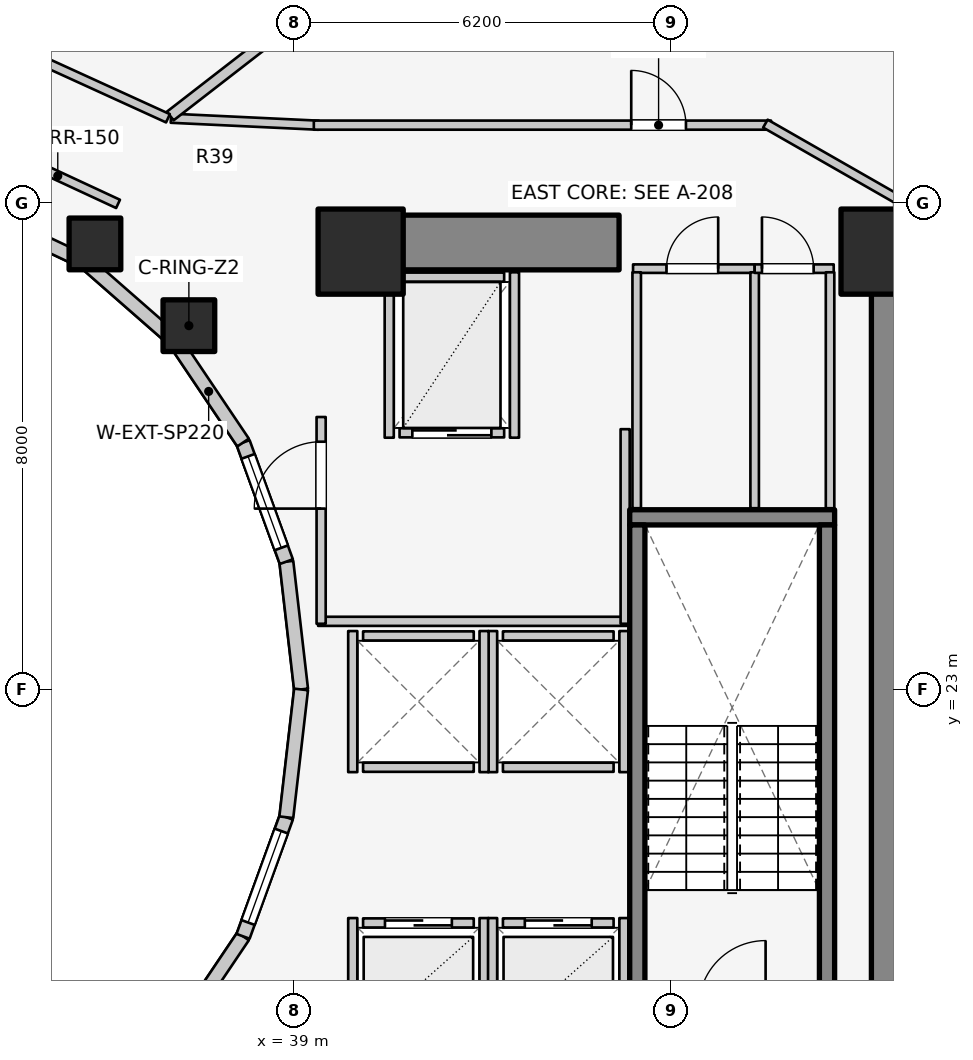
"""IFC4 building model, lengths in metres.
Left out: names, types, materials, properties, quantities, classifications, styles, units other than length and angle.
Written with IfcOpenShell. Run it as: python <this file> out.ifc"""

import sys

from ifc_helpers import new_model, si_unit, direction, frame, frame_2d, origin, origin_2d, place, context, subcontext, project, spatial, rectangle, extrude, element, fill, save


model = new_model("IFC4")
c1 = context("Model", 3, precision=1e-05, world=origin(), true_north=direction((0.0, 1.0)))
c2 = subcontext(c1, "Body", "Model", "MODEL_VIEW")
j1 = project(units=[si_unit("LENGTHUNIT", "METRE"), si_unit("PLANEANGLEUNIT", "RADIAN")], contexts=[c1])
p1 = place(None, origin())
s1 = spatial("IfcSite", under=j1, at=p1, CompositionType="ELEMENT")
p2 = place(p1, origin())
s2 = spatial("IfcBuilding", under=s1, at=p2, CompositionType="ELEMENT")
p3 = place(p2, frame((0.0, 0.0, 79.4)))
s3 = spatial("IfcBuildingStorey", under=s2, at=p3, CompositionType="ELEMENT", Elevation=79.4)
p4 = place(p3, frame((48.95, 17.05, 0.0), z_axis=(0.0, 0.0, 1.0), x_axis=(0.0, 1.0, 0.0)))
e1 = element("IfcWall", 1, at=p4, inside=s3, PredefinedType="SHEAR", context=c2, shape_type="SweptSolid", body=[
    extrude(rectangle(XDim=12.8, YDim=0.9, at=frame_2d((6.4, 0.0))), origin(), (0.0, 0.0, 1.0), 3.1),
])
p5 = place(p3, frame((39.85, 30.35, 0.0), z_axis=(0.0, 0.0, 1.0), x_axis=(1.0, 0.0, 0.0)))
e2 = element("IfcWall", 2, at=p5, inside=s3, PredefinedType="SHEAR", context=c2, shape_type="SweptSolid", body=[
    extrude(rectangle(XDim=4.5, YDim=0.9, at=frame_2d((2.25, 0.0))), origin(), (0.0, 0.0, 1.0), 3.1),
])
p6 = place(p3, frame((44.525, 25.83, 0.0), z_axis=(0.0, 0.0, 1.0), x_axis=(1.0, 0.0, 0.0)))
e3 = element("IfcWall", 3, at=p6, inside=s3, PredefinedType="SOLIDWALL", context=c2, shape_type="SweptSolid", body=[
    extrude(rectangle(XDim=3.37, YDim=0.25, at=frame_2d((1.685, 0.0))), origin(), (0.0, 0.0, 1.0), 3.1),
])
for number, where, z_axis, x_axis in (
    (4, (44.65, 17.895, 0.0), (0.0, 0.0, 1.0), (0.0, 1.0, 0.0)),
    (5, (47.77, 17.895, 0.0), (0.0, 0.0, 1.0), (0.0, 1.0, 0.0)),
):
    element("IfcWall", number, at=place(p3, frame(where, z_axis=z_axis, x_axis=x_axis)), inside=s3, PredefinedType="SOLIDWALL", context=c2, shape_type="SweptSolid", body=[
        extrude(rectangle(XDim=7.81, YDim=0.25, at=frame_2d((3.905, 0.0))), origin(), (0.0, 0.0, 1.0), 3.1),
    ])
for number, where, z_axis, x_axis in (
    (6, (48.7, 30.2, 0.0), (0.0, 0.0, 1.0), (1.0, 0.0, 0.0)),
    (7, (40.1, 30.2, 0.0), (0.0, 0.0, 1.0), (1.0, 0.0, 0.0)),
):
    element("IfcColumn", number, at=place(p3, frame(where, z_axis=z_axis, x_axis=x_axis)), inside=s3, PredefinedType="COLUMN", context=c2, shape_type="SweptSolid", body=[
        extrude(rectangle(XDim=1.4, YDim=1.4, at=origin_2d()), origin(), (0.0, 0.0, 1.0), 3.1),
    ])
for number, where, z_axis, x_axis in (
    (8, (37.275, 28.982, 0.0), (0.0, 0.0, 1.0), (1.0, 0.0, 0.0)),
    (9, (35.73, 30.327, 0.0), (0.0, 0.0, 1.0), (1.0, 0.0, 0.0)),
):
    element("IfcColumn", number, at=place(p3, frame(where, z_axis=z_axis, x_axis=x_axis)), inside=s3, PredefinedType="COLUMN", context=c2, shape_type="SweptSolid", body=[
        extrude(rectangle(XDim=0.85, YDim=0.85, at=origin_2d()), origin(), (0.0, 0.0, 1.0), 3.1),
    ])
p7 = place(p3, frame((39.12, 23.0, 0.0), z_axis=(0.0, 0.0, 1.0), x_axis=(-0.114711713601, 0.993398823617, 0.0)))
e10 = element("IfcWall", 10, at=p7, inside=s3, PredefinedType="STANDARD", context=c2, shape_type="SweptSolid", body=[
    extrude(rectangle(XDim=2.115, YDim=0.23, at=frame_2d((1.058, 0.0))), origin(), (0.0, 0.0, 1.0), 2.84),
])
p8 = place(p3, frame((38.877, 25.102, 0.0), z_axis=(0.0, 0.0, 1.0), x_axis=(-0.341423187295, 0.93990968033, 0.0)))
e11 = element("IfcWall", 11, at=p8, inside=s3, PredefinedType="STANDARD", context=c2, shape_type="SweptSolid", body=[
    extrude(rectangle(XDim=2.084, YDim=0.23, at=frame_2d((1.042, 0.0))), origin(), (0.0, 0.0, 1.0), 2.84),
])
p9 = place(p8, frame((0.242, 0.0, 0.85)))
e12 = element("IfcOpeningElement", 12, at=p9, cuts=e11, PredefinedType="OPENING", context=c2, shape_type="SweptSolid", body=[
    extrude(rectangle(XDim=1.6, YDim=1.65, at=frame_2d((0.8, 0.825))), frame((0.0, 0.125, 0.0), z_axis=(0.0, -1.0, 0.0), x_axis=(1.0, 0.0, 0.0)), (0.0, 0.0, 1.0), 0.25),
])
p10 = place(p3, frame((38.166, 27.06, 0.0), z_axis=(0.0, 0.0, 1.0), x_axis=(-0.558197800898, 0.829707909492, 0.0)))
e13 = element("IfcWall", 13, at=p10, inside=s3, PredefinedType="STANDARD", context=c2, shape_type="SweptSolid", body=[
    extrude(rectangle(XDim=2.027, YDim=0.23, at=frame_2d((1.013, 0.0))), origin(), (0.0, 0.0, 1.0), 2.16),
])
p11 = place(p3, frame((37.035, 28.742, 0.0), z_axis=(0.0, 0.0, 1.0), x_axis=(-0.752576694707, 0.658504607869, 0.0)))
e14 = element("IfcWall", 14, at=p11, inside=s3, PredefinedType="STANDARD", context=c2, shape_type="SweptSolid", body=[
    extrude(rectangle(XDim=1.959, YDim=0.23, at=frame_2d((0.98, 0.0))), origin(), (0.0, 0.0, 1.0), 2.16),
])
p12 = place(p3, frame((35.56, 30.032, 0.0), z_axis=(0.0, 0.0, 1.0), x_axis=(-0.904179699603, 0.427152280606, 0.0)))
e15 = element("IfcWall", 15, at=p12, inside=s3, PredefinedType="STANDARD", context=c2, shape_type="SweptSolid", body=[
    extrude(rectangle(XDim=1.899, YDim=0.23, at=frame_2d((0.95, 0.0))), origin(), (0.0, 0.0, 1.0), 2.16),
])
p13 = place(p3, frame((37.035, 17.258, 0.0), z_axis=(0.0, 0.0, 1.0), x_axis=(0.558197800898, 0.829707909492, 0.0)))
e16 = element("IfcWall", 16, at=p13, inside=s3, PredefinedType="STANDARD", context=c2, shape_type="SweptSolid", body=[
    extrude(rectangle(XDim=2.027, YDim=0.23, at=frame_2d((1.013, 0.0))), origin(), (0.0, 0.0, 1.0), 2.16),
])
p14 = place(p3, frame((38.166, 18.94, 0.0), z_axis=(0.0, 0.0, 1.0), x_axis=(0.341423187295, 0.93990968033, 0.0)))
e17 = element("IfcWall", 17, at=p14, inside=s3, PredefinedType="STANDARD", context=c2, shape_type="SweptSolid", body=[
    extrude(rectangle(XDim=2.084, YDim=0.23, at=frame_2d((1.042, 0.0))), origin(), (0.0, 0.0, 1.0), 2.84),
])
p15 = place(p14, frame((0.242, 0.0, 0.85)))
e18 = element("IfcOpeningElement", 18, at=p15, cuts=e17, PredefinedType="OPENING", context=c2, shape_type="SweptSolid", body=[
    extrude(rectangle(XDim=1.6, YDim=1.65, at=frame_2d((0.8, 0.825))), frame((0.0, 0.125, 0.0), z_axis=(0.0, -1.0, 0.0), x_axis=(1.0, 0.0, 0.0)), (0.0, 0.0, 1.0), 0.25),
])
p16 = place(p3, frame((38.877, 20.898, 0.0), z_axis=(0.0, 0.0, 1.0), x_axis=(0.114711713601, 0.993398823617, 0.0)))
e19 = element("IfcWall", 19, at=p16, inside=s3, PredefinedType="STANDARD", context=c2, shape_type="SweptSolid", body=[
    extrude(rectangle(XDim=2.115, YDim=0.23, at=frame_2d((1.058, 0.0))), origin(), (0.0, 0.0, 1.0), 2.84),
])
p17 = place(p3, frame((40.14, 19.16, 0.0), z_axis=(0.0, 0.0, 1.0), x_axis=(1.0, 0.0, 0.0)))
e20 = element("IfcWall", 20, at=p17, inside=s3, PredefinedType="SOLIDWALL", context=c2, shape_type="SweptSolid", body=[
    extrude(rectangle(XDim=1.82, YDim=0.15, at=frame_2d((0.91, 0.0))), origin(), (0.0, 0.0, 1.0), 2.12),
])
p18 = place(p17, frame((0.36, 0.0, 0.0)))
e21 = element("IfcOpeningElement", 21, at=p18, cuts=e20, PredefinedType="OPENING", context=c2, shape_type="SweptSolid", body=[
    extrude(rectangle(XDim=1.1, YDim=2.1, at=frame_2d((0.55, 1.05))), frame((0.0, 0.085, 0.0), z_axis=(0.0, -1.0, 0.0), x_axis=(1.0, 0.0, 0.0)), (0.0, 0.0, 1.0), 0.17),
])
p19 = place(p3, frame((39.97, 17.02, 0.0), z_axis=(0.0, 0.0, 1.0), x_axis=(0.0, 1.0, 0.0)))
e22 = element("IfcWall", 22, at=p19, inside=s3, PredefinedType="SOLIDWALL", context=c2, shape_type="SweptSolid", body=[
    extrude(rectangle(XDim=2.22, YDim=0.15, at=frame_2d((1.11, 0.0))), origin(), (0.0, 0.0, 1.0), 2.12),
])
p20 = place(p3, frame((42.13, 17.02, 0.0), z_axis=(0.0, 0.0, 1.0), x_axis=(0.0, 1.0, 0.0)))
e23 = element("IfcWall", 23, at=p20, inside=s3, PredefinedType="SOLIDWALL", context=c2, shape_type="SweptSolid", body=[
    extrude(rectangle(XDim=2.22, YDim=0.15, at=frame_2d((1.11, 0.0))), origin(), (0.0, 0.0, 1.0), 2.855),
])
p21 = place(p3, frame((42.44, 19.16, 0.0), z_axis=(0.0, 0.0, 1.0), x_axis=(1.0, 0.0, 0.0)))
e24 = element("IfcWall", 24, at=p21, inside=s3, PredefinedType="SOLIDWALL", context=c2, shape_type="SweptSolid", body=[
    extrude(rectangle(XDim=1.82, YDim=0.15, at=frame_2d((0.91, 0.0))), origin(), (0.0, 0.0, 1.0), 2.855),
])
p22 = place(p21, frame((0.36, 0.0, 0.0)))
e25 = element("IfcOpeningElement", 25, at=p22, cuts=e24, PredefinedType="OPENING", context=c2, shape_type="SweptSolid", body=[
    extrude(rectangle(XDim=1.1, YDim=2.1, at=frame_2d((0.55, 1.05))), frame((0.0, 0.085, 0.0), z_axis=(0.0, -1.0, 0.0), x_axis=(1.0, 0.0, 0.0)), (0.0, 0.0, 1.0), 0.17),
])
p23 = place(p3, frame((42.27, 17.02, 0.0), z_axis=(0.0, 0.0, 1.0), x_axis=(0.0, 1.0, 0.0)))
e26 = element("IfcWall", 26, at=p23, inside=s3, PredefinedType="SOLIDWALL", context=c2, shape_type="SweptSolid", body=[
    extrude(rectangle(XDim=2.22, YDim=0.15, at=frame_2d((1.11, 0.0))), origin(), (0.0, 0.0, 1.0), 2.855),
])
p24 = place(p3, frame((44.43, 17.02, 0.0), z_axis=(0.0, 0.0, 1.0), x_axis=(0.0, 1.0, 0.0)))
e27 = element("IfcWall", 27, at=p24, inside=s3, PredefinedType="SOLIDWALL", context=c2, shape_type="SweptSolid", body=[
    extrude(rectangle(XDim=2.22, YDim=0.15, at=frame_2d((1.11, 0.0))), origin(), (0.0, 0.0, 1.0), 2.12),
])
for number, where, z_axis, x_axis in (
    (28, (42.44, 21.72, 0.0), (0.0, 0.0, 1.0), (1.0, 0.0, 0.0)),
    (29, (42.44, 23.88, 0.0), (0.0, 0.0, 1.0), (1.0, 0.0, 0.0)),
):
    element("IfcWall", number, at=place(p3, frame(where, z_axis=z_axis, x_axis=x_axis)), inside=s3, PredefinedType="SOLIDWALL", context=c2, shape_type="SweptSolid", body=[
        extrude(rectangle(XDim=1.82, YDim=0.15, at=frame_2d((0.91, 0.0))), origin(), (0.0, 0.0, 1.0), 2.855),
    ])
for number, where, z_axis, x_axis in (
    (30, (42.27, 21.64, 0.0), (0.0, 0.0, 1.0), (0.0, 1.0, 0.0)),
    (31, (44.43, 21.64, 0.0), (0.0, 0.0, 1.0), (0.0, 1.0, 0.0)),
):
    element("IfcWall", number, at=place(p3, frame(where, z_axis=z_axis, x_axis=x_axis)), inside=s3, PredefinedType="SOLIDWALL", context=c2, shape_type="SweptSolid", body=[
        extrude(rectangle(XDim=2.32, YDim=0.15, at=frame_2d((1.16, 0.0))), origin(), (0.0, 0.0, 1.0), 2.855),
    ])
for number, where, z_axis, x_axis in (
    (32, (40.14, 21.72, 0.0), (0.0, 0.0, 1.0), (1.0, 0.0, 0.0)),
    (33, (40.14, 23.88, 0.0), (0.0, 0.0, 1.0), (1.0, 0.0, 0.0)),
):
    element("IfcWall", number, at=place(p3, frame(where, z_axis=z_axis, x_axis=x_axis)), inside=s3, PredefinedType="SOLIDWALL", context=c2, shape_type="SweptSolid", body=[
        extrude(rectangle(XDim=1.82, YDim=0.15, at=frame_2d((0.91, 0.0))), origin(), (0.0, 0.0, 1.0), 2.12),
    ])
p25 = place(p3, frame((39.97, 21.64, 0.0), z_axis=(0.0, 0.0, 1.0), x_axis=(0.0, 1.0, 0.0)))
e34 = element("IfcWall", 34, at=p25, inside=s3, PredefinedType="SOLIDWALL", context=c2, shape_type="SweptSolid", body=[
    extrude(rectangle(XDim=2.32, YDim=0.15, at=frame_2d((1.16, 0.0))), origin(), (0.0, 0.0, 1.0), 2.12),
])
p26 = place(p3, frame((42.13, 21.64, 0.0), z_axis=(0.0, 0.0, 1.0), x_axis=(0.0, 1.0, 0.0)))
e35 = element("IfcWall", 35, at=p26, inside=s3, PredefinedType="SOLIDWALL", context=c2, shape_type="SweptSolid", body=[
    extrude(rectangle(XDim=2.32, YDim=0.15, at=frame_2d((1.16, 0.0))), origin(), (0.0, 0.0, 1.0), 2.855),
])
p27 = place(p3, frame((40.74, 27.22, 0.0), z_axis=(0.0, 0.0, 1.0), x_axis=(1.0, 0.0, 0.0)))
e36 = element("IfcWall", 36, at=p27, inside=s3, PredefinedType="SOLIDWALL", context=c2, shape_type="SweptSolid", body=[
    extrude(rectangle(XDim=1.72, YDim=0.15, at=frame_2d((0.86, 0.0))), origin(), (0.0, 0.0, 1.0), 2.855),
])
p28 = place(p27, frame((0.21, 0.0, 0.0)))
e37 = element("IfcOpeningElement", 37, at=p28, cuts=e36, PredefinedType="OPENING", context=c2, shape_type="SweptSolid", body=[
    extrude(rectangle(XDim=1.3, YDim=2.1, at=frame_2d((0.65, 1.05))), frame((0.0, 0.085, 0.0), z_axis=(0.0, -1.0, 0.0), x_axis=(1.0, 0.0, 0.0)), (0.0, 0.0, 1.0), 0.17),
])
p29 = place(p3, frame((40.74, 29.78, 0.0), z_axis=(0.0, 0.0, 1.0), x_axis=(1.0, 0.0, 0.0)))
e38 = element("IfcWall", 38, at=p29, inside=s3, PredefinedType="SOLIDWALL", context=c2, shape_type="SweptSolid", body=[
    extrude(rectangle(XDim=1.72, YDim=0.15, at=frame_2d((0.86, 0.0))), origin(), (0.0, 0.0, 1.0), 2.855),
])
for number, where, z_axis, x_axis in (
    (39, (40.57, 27.14, 0.0), (0.0, 0.0, 1.0), (0.0, 1.0, 0.0)),
    (40, (42.63, 27.14, 0.0), (0.0, 0.0, 1.0), (0.0, 1.0, 0.0)),
):
    element("IfcWall", number, at=place(p3, frame(where, z_axis=z_axis, x_axis=x_axis)), inside=s3, PredefinedType="SOLIDWALL", context=c2, shape_type="SweptSolid", body=[
        extrude(rectangle(XDim=2.72, YDim=0.15, at=frame_2d((1.36, 0.0))), origin(), (0.0, 0.0, 1.0), 2.855),
    ])
p30 = place(p3, frame((39.4, 24.12, 0.0), z_axis=(0.0, 0.0, 1.0), x_axis=(1.0, 0.0, 0.0)))
e41 = element("IfcWall", 41, at=p30, inside=s3, PredefinedType="PARTITIONING", context=c2, shape_type="SweptSolid", body=[
    extrude(rectangle(XDim=5.08, YDim=0.15, at=frame_2d((2.54, 0.0))), origin(), (0.0, 0.0, 1.0), 2.12),
])
p31 = place(p3, frame((44.45, 24.08, 0.0), z_axis=(0.0, 0.0, 1.0), x_axis=(0.0, 1.0, 0.0)))
e42 = element("IfcWall", 42, at=p31, inside=s3, PredefinedType="PARTITIONING", context=c2, shape_type="SweptSolid", body=[
    extrude(rectangle(XDim=3.2, YDim=0.15, at=frame_2d((1.6, 0.0))), origin(), (0.0, 0.0, 1.0), 2.855),
])
p32 = place(p3, frame((39.45, 24.08, 0.0), z_axis=(0.0, 0.0, 1.0), x_axis=(0.0, 1.0, 0.0)))
e43 = element("IfcWall", 43, at=p32, inside=s3, PredefinedType="PARTITIONING", context=c2, shape_type="SweptSolid", body=[
    extrude(rectangle(XDim=3.4, YDim=0.15, at=frame_2d((1.7, 0.0))), origin(), (0.0, 0.0, 1.0), 2.855),
])
p33 = place(p32, frame((1.894, 0.0, 0.0)))
e44 = element("IfcOpeningElement", 44, at=p33, cuts=e43, PredefinedType="OPENING", context=c2, shape_type="SweptSolid", body=[
    extrude(rectangle(XDim=1.1, YDim=2.1, at=frame_2d((0.55, 1.05))), frame((0.0, 0.085, 0.0), z_axis=(0.0, -1.0, 0.0), x_axis=(1.0, 0.0, 0.0)), (0.0, 0.0, 1.0), 0.17),
])
p34 = place(p3, frame((44.58, 29.92, 0.0), z_axis=(0.0, 0.0, 1.0), x_axis=(1.0, 0.0, 0.0)))
e45 = element("IfcWall", 45, at=p34, inside=s3, PredefinedType="PLUMBINGWALL", context=c2, shape_type="SweptSolid", body=[
    extrude(rectangle(XDim=2.0, YDim=0.14, at=frame_2d((1.0, 0.0))), origin(), (0.0, 0.0, 1.0), 2.855),
])
p35 = place(p34, frame((0.55, 0.0, 0.0)))
e46 = element("IfcOpeningElement", 46, at=p35, cuts=e45, PredefinedType="OPENING", context=c2, shape_type="SweptSolid", body=[
    extrude(rectangle(XDim=0.85, YDim=2.05, at=frame_2d((0.425, 1.025))), frame((0.0, 0.08, 0.0), z_axis=(0.0, -1.0, 0.0), x_axis=(1.0, 0.0, 0.0)), (0.0, 0.0, 1.0), 0.16),
])
for number, where, z_axis, x_axis in (
    (47, (44.64, 25.98, 0.0), (0.0, 0.0, 1.0), (0.0, 1.0, 0.0)),
    (48, (46.58, 25.98, 0.0), (0.0, 0.0, 1.0), (0.0, 1.0, 0.0)),
):
    element("IfcWall", number, at=place(p3, frame(where, z_axis=z_axis, x_axis=x_axis)), inside=s3, PredefinedType="PLUMBINGWALL", context=c2, shape_type="SweptSolid", body=[
        extrude(rectangle(XDim=3.88, YDim=0.14, at=frame_2d((1.94, 0.0))), origin(), (0.0, 0.0, 1.0), 2.855),
    ])
p36 = place(p3, frame((46.58, 29.92, 0.0), z_axis=(0.0, 0.0, 1.0), x_axis=(1.0, 0.0, 0.0)))
e49 = element("IfcWall", 49, at=p36, inside=s3, PredefinedType="PLUMBINGWALL", context=c2, shape_type="SweptSolid", body=[
    extrude(rectangle(XDim=1.3, YDim=0.14, at=frame_2d((0.65, 0.0))), origin(), (0.0, 0.0, 1.0), 2.855),
])
p37 = place(p36, frame((0.12, 0.0, 0.0)))
e50 = element("IfcOpeningElement", 50, at=p37, cuts=e49, PredefinedType="OPENING", context=c2, shape_type="SweptSolid", body=[
    extrude(rectangle(XDim=0.85, YDim=2.05, at=frame_2d((0.425, 1.025))), frame((0.0, 0.08, 0.0), z_axis=(0.0, -1.0, 0.0), x_axis=(1.0, 0.0, 0.0)), (0.0, 0.0, 1.0), 0.16),
])
p38 = place(p3, frame((47.82, 25.98, 0.0), z_axis=(0.0, 0.0, 1.0), x_axis=(0.0, 1.0, 0.0)))
e51 = element("IfcWall", 51, at=p38, inside=s3, PredefinedType="PLUMBINGWALL", context=c2, shape_type="SweptSolid", body=[
    extrude(rectangle(XDim=3.88, YDim=0.14, at=frame_2d((1.94, 0.0))), origin(), (0.0, 0.0, 1.0), 2.855),
])
p39 = place(p3, frame((36.11, 30.985, 0.0), z_axis=(0.0, 0.0, 1.0), x_axis=(-0.906943449489, 0.421252393975, 0.0)))
e52 = element("IfcWall", 52, at=p39, inside=s3, PredefinedType="PARTITIONING", context=c2, shape_type="SweptSolid", body=[
    extrude(rectangle(XDim=2.186, YDim=0.15, at=frame_2d((1.093, 0.0))), origin(), (0.0, 0.0, 1.0), 2.272),
])
p40 = place(p3, frame((36.98, 32.394, 0.0), z_axis=(0.0, 0.0, 1.0), x_axis=(0.998877427952, -0.047369651964, 0.0)))
e53 = element("IfcWall", 53, at=p40, inside=s3, PredefinedType="PARTITIONING", context=c2, shape_type="SweptSolid", body=[
    extrude(rectangle(XDim=2.433, YDim=0.15, at=frame_2d((1.216, 0.0))), origin(), (0.0, 0.0, 1.0), 2.272),
])
p41 = place(p3, frame((39.33, 32.28, 0.0), z_axis=(0.0, 0.0, 1.0), x_axis=(1.0, 0.0, 0.0)))
e54 = element("IfcWall", 54, at=p41, inside=s3, PredefinedType="PARTITIONING", context=c2, shape_type="SweptSolid", body=[
    extrude(rectangle(XDim=7.52, YDim=0.15, at=frame_2d((3.76, 0.0))), origin(), (0.0, 0.0, 1.0), 2.272),
])
p42 = place(p41, frame((5.22, 0.0, 0.0)))
e55 = element("IfcOpeningElement", 55, at=p42, cuts=e54, PredefinedType="OPENING", context=c2, shape_type="SweptSolid", body=[
    extrude(rectangle(XDim=0.9, YDim=2.1, at=frame_2d((0.45, 1.05))), frame((0.0, 0.085, 0.0), z_axis=(0.0, -1.0, 0.0), x_axis=(1.0, 0.0, 0.0)), (0.0, 0.0, 1.0), 0.17),
])
p43 = place(p3, frame((46.757, 32.305, 0.0), z_axis=(0.0, 0.0, 1.0), x_axis=(0.867991349648, -0.496579315857, 0.0)))
e56 = element("IfcWall", 56, at=p43, inside=s3, PredefinedType="PARTITIONING", context=c2, shape_type="SweptSolid", body=[
    extrude(rectangle(XDim=2.567, YDim=0.15, at=frame_2d((1.283, 0.0))), origin(), (0.0, 0.0, 1.0), 2.142),
])
p44 = place(p3, frame((36.969, 32.43, 0.0), z_axis=(0.0, 0.0, 1.0), x_axis=(0.790421780952, 0.612562983045, 0.0)))
e57 = element("IfcWall", 57, at=p44, inside=s3, PredefinedType="PARTITIONING", context=c2, shape_type="SweptSolid", body=[
    extrude(rectangle(XDim=9.662, YDim=0.18, at=frame_2d((4.831, 0.0))), origin(), (0.0, 0.0, 1.0), 2.272),
])
p45 = place(p3, frame((36.931, 32.393, 0.0), z_axis=(0.0, 0.0, 1.0), x_axis=(-0.909747571199, 0.415161843982, 0.0)))
e58 = element("IfcWall", 58, at=p45, inside=s3, PredefinedType="PARTITIONING", context=c2, shape_type="SweptSolid", body=[
    extrude(rectangle(XDim=2.625, YDim=0.15, at=frame_2d((1.312, 0.0))), origin(), (0.0, 0.0, 1.0), 2.272),
])
p46 = place(p9, origin())
e59 = element("IfcWindow", 59, at=p46, inside=s3, PartitioningType="SINGLE_PANEL", PredefinedType="WINDOW", context=c2, shape_type="SweptSolid", body=[
    extrude(rectangle(XDim=1.6, YDim=1.65, at=frame_2d((0.8, 0.825))), frame((0.0, 0.03, 0.0), z_axis=(0.0, -1.0, 0.0), x_axis=(1.0, 0.0, 0.0)), (0.0, 0.0, 1.0), 0.06),
])
fill(e12, e59)
p47 = place(p15, origin())
e60 = element("IfcWindow", 60, at=p47, inside=s3, PartitioningType="SINGLE_PANEL", PredefinedType="WINDOW", context=c2, shape_type="SweptSolid", body=[
    extrude(rectangle(XDim=1.6, YDim=1.65, at=frame_2d((0.8, 0.825))), frame((0.0, 0.03, 0.0), z_axis=(0.0, -1.0, 0.0), x_axis=(1.0, 0.0, 0.0)), (0.0, 0.0, 1.0), 0.06),
])
fill(e18, e60)
p48 = place(p18, origin())
e61 = element("IfcDoor", 61, at=p48, inside=s3, OperationType="DOUBLE_DOOR_SLIDING", PredefinedType="DOOR", context=c2, shape_type="SweptSolid", body=[
    extrude(rectangle(XDim=1.1, YDim=2.1, at=frame_2d((0.55, 1.05))), frame((0.0, 0.025, 0.0), z_axis=(0.0, -1.0, 0.0), x_axis=(1.0, 0.0, 0.0)), (0.0, 0.0, 1.0), 0.05),
])
fill(e21, e61)
p49 = place(p22, origin())
e62 = element("IfcDoor", 62, at=p49, inside=s3, OperationType="DOUBLE_DOOR_SLIDING", PredefinedType="DOOR", context=c2, shape_type="SweptSolid", body=[
    extrude(rectangle(XDim=1.1, YDim=2.1, at=frame_2d((0.55, 1.05))), frame((0.0, 0.025, 0.0), z_axis=(0.0, -1.0, 0.0), x_axis=(1.0, 0.0, 0.0)), (0.0, 0.0, 1.0), 0.05),
])
fill(e25, e62)
p50 = place(p28, origin())
e63 = element("IfcDoor", 63, at=p50, inside=s3, OperationType="DOUBLE_DOOR_SLIDING", PredefinedType="DOOR", context=c2, shape_type="SweptSolid", body=[
    extrude(rectangle(XDim=1.3, YDim=2.1, at=frame_2d((0.65, 1.05))), frame((0.0, 0.025, 0.0), z_axis=(0.0, -1.0, 0.0), x_axis=(1.0, 0.0, 0.0)), (0.0, 0.0, 1.0), 0.05),
])
fill(e37, e63)
p51 = place(p33, origin())
e64 = element("IfcDoor", 64, at=p51, inside=s3, OperationType="SINGLE_SWING_LEFT", PredefinedType="DOOR", context=c2, shape_type="SweptSolid", body=[
    extrude(rectangle(XDim=1.1, YDim=2.1, at=frame_2d((0.55, 1.05))), frame((0.0, 0.025, 0.0), z_axis=(0.0, -1.0, 0.0), x_axis=(1.0, 0.0, 0.0)), (0.0, 0.0, 1.0), 0.05),
])
fill(e44, e64)
p52 = place(p35, origin())
e65 = element("IfcDoor", 65, at=p52, inside=s3, OperationType="SINGLE_SWING_RIGHT", PredefinedType="DOOR", context=c2, shape_type="SweptSolid", body=[
    extrude(rectangle(XDim=0.85, YDim=2.05, at=frame_2d((0.425, 1.025))), frame((0.0, 0.025, 0.0), z_axis=(0.0, -1.0, 0.0), x_axis=(1.0, 0.0, 0.0)), (0.0, 0.0, 1.0), 0.05),
])
fill(e46, e65)
p53 = place(p37, origin())
e66 = element("IfcDoor", 66, at=p53, inside=s3, OperationType="SINGLE_SWING_LEFT", PredefinedType="DOOR", context=c2, shape_type="SweptSolid", body=[
    extrude(rectangle(XDim=0.85, YDim=2.05, at=frame_2d((0.425, 1.025))), frame((0.0, 0.025, 0.0), z_axis=(0.0, -1.0, 0.0), x_axis=(1.0, 0.0, 0.0)), (0.0, 0.0, 1.0), 0.05),
])
fill(e50, e66)
p54 = place(p42, origin())
e67 = element("IfcDoor", 67, at=p54, inside=s3, OperationType="SINGLE_SWING_LEFT", PredefinedType="DOOR", context=c2, shape_type="SweptSolid", body=[
    extrude(rectangle(XDim=0.9, YDim=2.1, at=frame_2d((0.45, 1.05))), frame((0.0, 0.025, 0.0), z_axis=(0.0, -1.0, 0.0), x_axis=(1.0, 0.0, 0.0)), (0.0, 0.0, 1.0), 0.05),
])
fill(e55, e67)
save(model, sys.argv[1])
